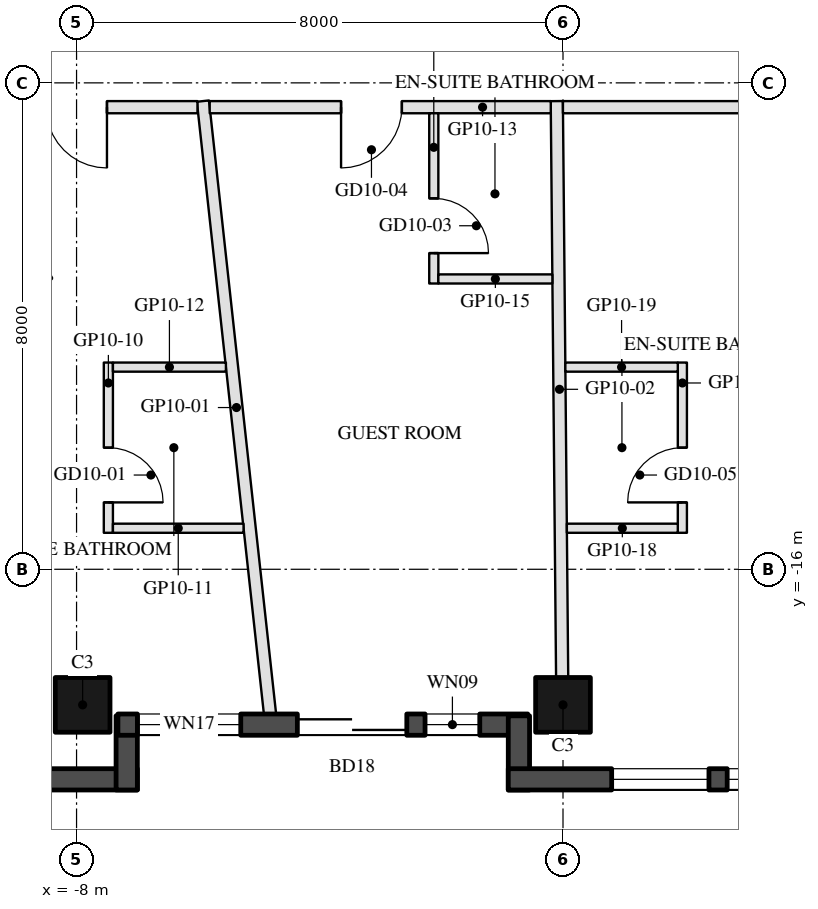
"""IFC4 building model, lengths in metres.
Left out: names, types, materials, properties, quantities, classifications, styles, units other than length and angle.
Written with IfcOpenShell. Run it as: python <this file> out.ifc"""

import sys

from ifc_helpers import new_model, si_unit, direction, frame, frame_2d, origin, origin_2d, place, context, subcontext, project, spatial, rectangle, hollow_rectangle, extrude, element, fill, save


model = new_model("IFC4")
c1 = context("Model", 3, precision=1e-05, world=origin(), true_north=direction((0.0, 1.0)))
c2 = subcontext(c1, "Body", "Model", "MODEL_VIEW")
j1 = project(units=[si_unit("LENGTHUNIT", "METRE"), si_unit("PLANEANGLEUNIT", "RADIAN")], contexts=[c1])
p1 = place(None, origin())
s1 = spatial("IfcSite", under=j1, at=p1, CompositionType="ELEMENT")
p2 = place(p1, origin())
s2 = spatial("IfcBuilding", under=s1, at=p2, CompositionType="ELEMENT")
p3 = place(p2, frame((0.0, 0.0, 120.5)))
s3 = spatial("IfcBuildingStorey", under=s2, at=p3, CompositionType="ELEMENT", Elevation=120.5)
for number, where, z_axis, x_axis in (
    (1, (-7.9, -18.23, 0.0), (0.0, 0.0, 1.0), (-1.0, 0.0, 0.0)),
    (2, (0.0, -18.23, 0.0), (0.0, 0.0, 1.0), (-1.0, 0.0, 0.0)),
):
    element("IfcColumn", number, at=place(p3, frame(where, z_axis=z_axis, x_axis=x_axis)), inside=s3, PredefinedType="COLUMN", context=c2, shape_type="SweptSolid", body=[
        extrude(hollow_rectangle(XDim=0.9, YDim=0.9, WallThickness=0.04, at=origin_2d()), origin(), (0.0, 0.0, 1.0), 3.7),
    ])
p4 = place(p3, frame((-18.816, -19.455, 0.0), z_axis=(0.0, 0.0, 1.0), x_axis=(1.0, 0.0, 0.0)))
e3 = element("IfcWall", 3, at=p4, inside=s3, PredefinedType="SOLIDWALL", context=c2, shape_type="SweptSolid", body=[
    extrude(rectangle(XDim=11.816, YDim=0.35, at=frame_2d((5.908, 0.0))), origin(), (0.0, 0.0, 1.0), 3.55),
])
p5 = place(p4, frame((0.381, 0.0, 0.3)))
e4 = element("IfcOpeningElement", 4, at=p5, cuts=e3, PredefinedType="OPENING", context=c2, shape_type="SweptSolid", body=[
    extrude(rectangle(XDim=1.8, YDim=2.65, at=frame_2d((0.9, 1.325))), frame((0.0, 0.185, 0.0), z_axis=(0.0, -1.0, 0.0), x_axis=(1.0, 0.0, 0.0)), (0.0, 0.0, 1.0), 0.37),
])
p6 = place(p4, frame((7.716, 0.0, 0.0)))
e5 = element("IfcOpeningElement", 5, at=p6, cuts=e3, PredefinedType="OPENING", context=c2, shape_type="SweptSolid", body=[
    extrude(rectangle(XDim=2.4, YDim=2.4, at=frame_2d((1.2, 1.2))), frame((0.0, 0.185, 0.0), z_axis=(0.0, -1.0, 0.0), x_axis=(1.0, 0.0, 0.0)), (0.0, 0.0, 1.0), 0.37),
])
p7 = place(p4, frame((3.816, 0.0, 0.3)))
e6 = element("IfcOpeningElement", 6, at=p7, cuts=e3, PredefinedType="OPENING", context=c2, shape_type="SweptSolid", body=[
    extrude(rectangle(XDim=1.6, YDim=2.65, at=frame_2d((0.8, 1.325))), frame((0.0, 0.185, 0.0), z_axis=(0.0, -1.0, 0.0), x_axis=(1.0, 0.0, 0.0)), (0.0, 0.0, 1.0), 0.37),
])
p8 = place(p4, frame((5.716, 0.0, 0.3)))
e7 = element("IfcOpeningElement", 7, at=p8, cuts=e3, PredefinedType="OPENING", context=c2, shape_type="SweptSolid", body=[
    extrude(rectangle(XDim=1.6, YDim=2.65, at=frame_2d((0.8, 1.325))), frame((0.0, 0.185, 0.0), z_axis=(0.0, -1.0, 0.0), x_axis=(1.0, 0.0, 0.0)), (0.0, 0.0, 1.0), 0.37),
])
p9 = place(p3, frame((-7.175, -19.63, 0.0), z_axis=(0.0, 0.0, 1.0), x_axis=(0.0, 1.0, 0.0)))
e8 = element("IfcWall", 8, at=p9, inside=s3, PredefinedType="SOLIDWALL", context=c2, shape_type="SweptSolid", body=[
    extrude(rectangle(XDim=1.22, YDim=0.35, at=frame_2d((0.61, 0.0))), origin(), (0.0, 0.0, 1.0), 3.55),
])
p10 = place(p3, frame((-7.32, -18.555, 0.0), z_axis=(0.0, 0.0, 1.0), x_axis=(1.0, 0.0, 0.0)))
e9 = element("IfcWall", 9, at=p10, inside=s3, PredefinedType="SOLIDWALL", context=c2, shape_type="SweptSolid", body=[
    extrude(rectangle(XDim=6.74, YDim=0.35, at=frame_2d((3.37, 0.0))), origin(), (0.0, 0.0, 1.0), 3.55),
])
p11 = place(p10, frame((0.32, 0.0, 0.3)))
e10 = element("IfcOpeningElement", 10, at=p11, cuts=e9, PredefinedType="OPENING", context=c2, shape_type="SweptSolid", body=[
    extrude(rectangle(XDim=1.7, YDim=2.65, at=frame_2d((0.85, 1.325))), frame((0.0, 0.185, 0.0), z_axis=(0.0, -1.0, 0.0), x_axis=(1.0, 0.0, 0.0)), (0.0, 0.0, 1.0), 0.37),
])
p12 = place(p10, frame((2.951, 0.0, 0.0)))
e11 = element("IfcOpeningElement", 11, at=p12, cuts=e9, PredefinedType="OPENING", context=c2, shape_type="SweptSolid", body=[
    extrude(rectangle(XDim=1.8, YDim=2.4, at=frame_2d((0.9, 1.2))), frame((0.0, 0.185, 0.0), z_axis=(0.0, -1.0, 0.0), x_axis=(1.0, 0.0, 0.0)), (0.0, 0.0, 1.0), 0.37),
])
p13 = place(p10, frame((5.051, 0.0, 0.3)))
e12 = element("IfcOpeningElement", 12, at=p13, cuts=e9, PredefinedType="OPENING", context=c2, shape_type="SweptSolid", body=[
    extrude(rectangle(XDim=0.9, YDim=2.65, at=frame_2d((0.45, 1.325))), frame((0.0, 0.185, 0.0), z_axis=(0.0, -1.0, 0.0), x_axis=(1.0, 0.0, 0.0)), (0.0, 0.0, 1.0), 0.37),
])
p14 = place(p3, frame((-0.725, -18.41, 0.0), z_axis=(0.0, 0.0, 1.0), x_axis=(0.0, -1.0, 0.0)))
e13 = element("IfcWall", 13, at=p14, inside=s3, PredefinedType="SOLIDWALL", context=c2, shape_type="SweptSolid", body=[
    extrude(rectangle(XDim=1.22, YDim=0.35, at=frame_2d((0.61, 0.0))), origin(), (0.0, 0.0, 1.0), 3.55),
])
p15 = place(p3, frame((-0.9, -19.455, 0.0), z_axis=(0.0, 0.0, 1.0), x_axis=(1.0, 0.0, 0.0)))
e14 = element("IfcWall", 14, at=p15, inside=s3, PredefinedType="SOLIDWALL", context=c2, shape_type="SweptSolid", body=[
    extrude(rectangle(XDim=9.7, YDim=0.35, at=frame_2d((4.85, 0.0))), origin(), (0.0, 0.0, 1.0), 3.55),
])
p16 = place(p15, frame((5.6, 0.0, 0.0)))
e15 = element("IfcOpeningElement", 15, at=p16, cuts=e14, PredefinedType="OPENING", context=c2, shape_type="SweptSolid", body=[
    extrude(rectangle(XDim=2.4, YDim=2.4, at=frame_2d((1.2, 1.2))), frame((0.0, 0.185, 0.0), z_axis=(0.0, -1.0, 0.0), x_axis=(1.0, 0.0, 0.0)), (0.0, 0.0, 1.0), 0.37),
])
p17 = place(p15, frame((1.7, 0.0, 0.3)))
e16 = element("IfcOpeningElement", 16, at=p17, cuts=e14, PredefinedType="OPENING", context=c2, shape_type="SweptSolid", body=[
    extrude(rectangle(XDim=1.6, YDim=2.65, at=frame_2d((0.8, 1.325))), frame((0.0, 0.185, 0.0), z_axis=(0.0, -1.0, 0.0), x_axis=(1.0, 0.0, 0.0)), (0.0, 0.0, 1.0), 0.37),
])
p18 = place(p15, frame((3.6, 0.0, 0.3)))
e17 = element("IfcOpeningElement", 17, at=p18, cuts=e14, PredefinedType="OPENING", context=c2, shape_type="SweptSolid", body=[
    extrude(rectangle(XDim=1.6, YDim=2.65, at=frame_2d((0.8, 1.325))), frame((0.0, 0.185, 0.0), z_axis=(0.0, -1.0, 0.0), x_axis=(1.0, 0.0, 0.0)), (0.0, 0.0, 1.0), 0.37),
])
p19 = place(p3, frame((-4.819, -18.38, 0.0), z_axis=(0.0, 0.0, 1.0), x_axis=(-0.108803544125, 0.994063272023, 0.0)))
e18 = element("IfcWall", 18, at=p19, inside=s3, PredefinedType="PARTITIONING", context=c2, shape_type="SweptSolid", body=[
    extrude(rectangle(XDim=10.14, YDim=0.2, at=frame_2d((5.07, 0.0))), origin(), (0.0, 0.0, 1.0), 2.96),
])
p20 = place(p3, frame((-0.014, -17.78, 0.0), z_axis=(0.0, 0.0, 1.0), x_axis=(-0.00927078365, 0.999957025362, 0.0)))
e19 = element("IfcWall", 19, at=p20, inside=s3, PredefinedType="PARTITIONING", context=c2, shape_type="SweptSolid", body=[
    extrude(rectangle(XDim=9.48, YDim=0.2, at=frame_2d((4.74, 0.0))), origin(), (0.0, 0.0, 1.0), 2.95),
])
p21 = place(p3, frame((-6.011, -8.4, 0.0), z_axis=(0.0, 0.0, 1.0), x_axis=(-1.0, 0.0, 0.0)))
e20 = element("IfcWall", 20, at=p21, inside=s3, PredefinedType="PARTITIONING", context=c2, shape_type="SweptSolid", body=[
    extrude(rectangle(XDim=3.977, YDim=0.2, at=frame_2d((1.988, 0.0))), origin(), (0.0, 0.0, 1.0), 2.95),
])
p22 = place(p21, frame((1.488, 0.0, 0.0)))
e21 = element("IfcOpeningElement", 21, at=p22, cuts=e20, PredefinedType="OPENING", context=c2, shape_type="SweptSolid", body=[
    extrude(rectangle(XDim=1.0, YDim=2.1, at=frame_2d((0.5, 1.05))), frame((0.0, 0.11, 0.0), z_axis=(0.0, -1.0, 0.0), x_axis=(1.0, 0.0, 0.0)), (0.0, 0.0, 1.0), 0.22),
])
p23 = place(p3, frame((-7.477, -12.6, 0.0), z_axis=(0.0, 0.0, 1.0), x_axis=(0.0, -1.0, 0.0)))
e22 = element("IfcWall", 22, at=p23, inside=s3, PredefinedType="PARTITIONING", context=c2, shape_type="SweptSolid", body=[
    extrude(rectangle(XDim=2.8, YDim=0.15, at=frame_2d((1.4, 0.0))), origin(), (0.0, 0.0, 1.0), 3.55),
])
p24 = place(p23, frame((1.4, 0.0, 0.0)))
e23 = element("IfcOpeningElement", 23, at=p24, cuts=e22, PredefinedType="OPENING", context=c2, shape_type="SweptSolid", body=[
    extrude(rectangle(XDim=0.9, YDim=2.1, at=frame_2d((0.45, 1.05))), frame((0.0, 0.085, 0.0), z_axis=(0.0, -1.0, 0.0), x_axis=(1.0, 0.0, 0.0)), (0.0, 0.0, 1.0), 0.17),
])
p25 = place(p3, frame((-7.402, -15.325, 0.0), z_axis=(0.0, 0.0, 1.0), x_axis=(1.0, 0.0, 0.0)))
e24 = element("IfcWall", 24, at=p25, inside=s3, PredefinedType="PARTITIONING", context=c2, shape_type="SweptSolid", body=[
    extrude(rectangle(XDim=2.148, YDim=0.15, at=frame_2d((1.074, 0.0))), origin(), (0.0, 0.0, 1.0), 3.55),
])
p26 = place(p3, frame((-7.402, -12.675, 0.0), z_axis=(0.0, 0.0, 1.0), x_axis=(1.0, 0.0, 0.0)))
e25 = element("IfcWall", 25, at=p26, inside=s3, PredefinedType="PARTITIONING", context=c2, shape_type="SweptSolid", body=[
    extrude(rectangle(XDim=1.858, YDim=0.15, at=frame_2d((0.929, 0.0))), origin(), (0.0, 0.0, 1.0), 3.55),
])
p27 = place(p3, frame((-0.201, -8.4, 0.0), z_axis=(0.0, 0.0, 1.0), x_axis=(-1.0, 0.0, 0.0)))
e26 = element("IfcWall", 26, at=p27, inside=s3, PredefinedType="PARTITIONING", context=c2, shape_type="SweptSolid", body=[
    extrude(rectangle(XDim=5.609, YDim=0.2, at=frame_2d((2.805, 0.0))), origin(), (0.0, 0.0, 1.0), 2.95),
])
p28 = place(p27, frame((2.449, 0.0, 0.0)))
e27 = element("IfcOpeningElement", 27, at=p28, cuts=e26, PredefinedType="OPENING", context=c2, shape_type="SweptSolid", body=[
    extrude(rectangle(XDim=1.0, YDim=2.1, at=frame_2d((0.5, 1.05))), frame((0.0, 0.11, 0.0), z_axis=(0.0, -1.0, 0.0), x_axis=(1.0, 0.0, 0.0)), (0.0, 0.0, 1.0), 0.22),
])
p29 = place(p3, frame((-2.125, -8.5, 0.0), z_axis=(0.0, 0.0, 1.0), x_axis=(0.0, -1.0, 0.0)))
e28 = element("IfcWall", 28, at=p29, inside=s3, PredefinedType="PARTITIONING", context=c2, shape_type="SweptSolid", body=[
    extrude(rectangle(XDim=2.8, YDim=0.15, at=frame_2d((1.4, 0.0))), origin(), (0.0, 0.0, 1.0), 3.55),
])
p30 = place(p29, frame((1.4, 0.0, 0.0)))
e29 = element("IfcOpeningElement", 29, at=p30, cuts=e28, PredefinedType="OPENING", context=c2, shape_type="SweptSolid", body=[
    extrude(rectangle(XDim=0.9, YDim=2.1, at=frame_2d((0.45, 1.05))), frame((0.0, 0.085, 0.0), z_axis=(0.0, -1.0, 0.0), x_axis=(1.0, 0.0, 0.0)), (0.0, 0.0, 1.0), 0.17),
])
p31 = place(p3, frame((-2.05, -11.225, 0.0), z_axis=(0.0, 0.0, 1.0), x_axis=(1.0, 0.0, 0.0)))
e30 = element("IfcWall", 30, at=p31, inside=s3, PredefinedType="PARTITIONING", context=c2, shape_type="SweptSolid", body=[
    extrude(rectangle(XDim=1.875, YDim=0.15, at=frame_2d((0.938, 0.0))), origin(), (0.0, 0.0, 1.0), 3.55),
])
p32 = place(p3, frame((9.988, -8.4, 0.0), z_axis=(0.0, 0.0, 1.0), x_axis=(-1.0, 0.0, 0.0)))
e31 = element("IfcWall", 31, at=p32, inside=s3, PredefinedType="PARTITIONING", context=c2, shape_type="SweptSolid", body=[
    extrude(rectangle(XDim=9.989, YDim=0.2, at=frame_2d((4.995, 0.0))), origin(), (0.0, 0.0, 1.0), 2.95),
])
p33 = place(p32, frame((4.495, 0.0, 0.0)))
e32 = element("IfcOpeningElement", 32, at=p33, cuts=e31, PredefinedType="OPENING", context=c2, shape_type="SweptSolid", body=[
    extrude(rectangle(XDim=1.0, YDim=2.1, at=frame_2d((0.5, 1.05))), frame((0.0, 0.11, 0.0), z_axis=(0.0, -1.0, 0.0), x_axis=(1.0, 0.0, 0.0)), (0.0, 0.0, 1.0), 0.22),
])
p34 = place(p3, frame((1.963, -15.4, 0.0), z_axis=(0.0, 0.0, 1.0), x_axis=(0.0, 1.0, 0.0)))
e33 = element("IfcWall", 33, at=p34, inside=s3, PredefinedType="PARTITIONING", context=c2, shape_type="SweptSolid", body=[
    extrude(rectangle(XDim=2.8, YDim=0.15, at=frame_2d((1.4, 0.0))), origin(), (0.0, 0.0, 1.0), 3.55),
])
p35 = place(p34, frame((0.5, 0.0, 0.0)))
e34 = element("IfcOpeningElement", 34, at=p35, cuts=e33, PredefinedType="OPENING", context=c2, shape_type="SweptSolid", body=[
    extrude(rectangle(XDim=0.9, YDim=2.1, at=frame_2d((0.45, 1.05))), frame((0.0, 0.085, 0.0), z_axis=(0.0, -1.0, 0.0), x_axis=(1.0, 0.0, 0.0)), (0.0, 0.0, 1.0), 0.17),
])
p36 = place(p3, frame((0.063, -15.325, 0.0), z_axis=(0.0, 0.0, 1.0), x_axis=(1.0, 0.0, 0.0)))
e35 = element("IfcWall", 35, at=p36, inside=s3, PredefinedType="PARTITIONING", context=c2, shape_type="SweptSolid", body=[
    extrude(rectangle(XDim=1.825, YDim=0.15, at=frame_2d((0.912, 0.0))), origin(), (0.0, 0.0, 1.0), 2.95),
])
p37 = place(p3, frame((0.039, -12.675, 0.0), z_axis=(0.0, 0.0, 1.0), x_axis=(1.0, 0.0, 0.0)))
e36 = element("IfcWall", 36, at=p37, inside=s3, PredefinedType="PARTITIONING", context=c2, shape_type="SweptSolid", body=[
    extrude(rectangle(XDim=1.849, YDim=0.15, at=frame_2d((0.925, 0.0))), origin(), (0.0, 0.0, 1.0), 2.95),
])
p38 = place(p11, origin())
e37 = element("IfcWindow", 37, at=p38, inside=s3, PartitioningType="SINGLE_PANEL", PredefinedType="WINDOW", context=c2, shape_type="SweptSolid", body=[
    extrude(rectangle(XDim=1.7, YDim=2.65, at=frame_2d((0.85, 1.325))), frame((0.0, 0.03, 0.0), z_axis=(0.0, -1.0, 0.0), x_axis=(1.0, 0.0, 0.0)), (0.0, 0.0, 1.0), 0.06),
])
fill(e10, e37)
p39 = place(p12, frame((1.8, 0.0, 0.0), z_axis=(0.0, 0.0, 1.0), x_axis=(-1.0, 0.0, 0.0)))
e38 = element("IfcDoor", 38, at=p39, inside=s3, OperationType="SLIDING_TO_LEFT", PredefinedType="DOOR", context=c2, shape_type="SweptSolid", body=[
    extrude(rectangle(XDim=1.8, YDim=2.4, at=frame_2d((0.9, 1.2))), frame((0.0, 0.025, 0.0), z_axis=(0.0, -1.0, 0.0), x_axis=(1.0, 0.0, 0.0)), (0.0, 0.0, 1.0), 0.05),
])
fill(e11, e38)
p40 = place(p13, origin())
e39 = element("IfcWindow", 39, at=p40, inside=s3, PartitioningType="SINGLE_PANEL", PredefinedType="WINDOW", context=c2, shape_type="SweptSolid", body=[
    extrude(rectangle(XDim=0.9, YDim=2.65, at=frame_2d((0.45, 1.325))), frame((0.0, 0.03, 0.0), z_axis=(0.0, -1.0, 0.0), x_axis=(1.0, 0.0, 0.0)), (0.0, 0.0, 1.0), 0.06),
])
fill(e12, e39)
p41 = place(p17, origin())
e40 = element("IfcWindow", 40, at=p41, inside=s3, PartitioningType="SINGLE_PANEL", PredefinedType="WINDOW", context=c2, shape_type="SweptSolid", body=[
    extrude(rectangle(XDim=1.6, YDim=2.65, at=frame_2d((0.8, 1.325))), frame((0.0, 0.03, 0.0), z_axis=(0.0, -1.0, 0.0), x_axis=(1.0, 0.0, 0.0)), (0.0, 0.0, 1.0), 0.06),
])
fill(e16, e40)
p42 = place(p18, origin())
e41 = element("IfcWindow", 41, at=p42, inside=s3, PartitioningType="SINGLE_PANEL", PredefinedType="WINDOW", context=c2, shape_type="SweptSolid", body=[
    extrude(rectangle(XDim=1.6, YDim=2.65, at=frame_2d((0.8, 1.325))), frame((0.0, 0.03, 0.0), z_axis=(0.0, -1.0, 0.0), x_axis=(1.0, 0.0, 0.0)), (0.0, 0.0, 1.0), 0.06),
])
fill(e17, e41)
p43 = place(p24, origin())
e42 = element("IfcDoor", 42, at=p43, inside=s3, OperationType="SINGLE_SWING_RIGHT", PredefinedType="DOOR", context=c2, shape_type="SweptSolid", body=[
    extrude(rectangle(XDim=0.9, YDim=2.1, at=frame_2d((0.45, 1.05))), frame((0.0, 0.025, 0.0), z_axis=(0.0, -1.0, 0.0), x_axis=(1.0, 0.0, 0.0)), (0.0, 0.0, 1.0), 0.05),
])
fill(e23, e42)
p44 = place(p22, origin())
e43 = element("IfcDoor", 43, at=p44, inside=s3, OperationType="SINGLE_SWING_LEFT", PredefinedType="DOOR", context=c2, shape_type="SweptSolid", body=[
    extrude(rectangle(XDim=1.0, YDim=2.1, at=frame_2d((0.5, 1.05))), frame((0.0, 0.025, 0.0), z_axis=(0.0, -1.0, 0.0), x_axis=(1.0, 0.0, 0.0)), (0.0, 0.0, 1.0), 0.05),
])
fill(e21, e43)
p45 = place(p30, origin())
e44 = element("IfcDoor", 44, at=p45, inside=s3, OperationType="SINGLE_SWING_RIGHT", PredefinedType="DOOR", context=c2, shape_type="SweptSolid", body=[
    extrude(rectangle(XDim=0.9, YDim=2.1, at=frame_2d((0.45, 1.05))), frame((0.0, 0.025, 0.0), z_axis=(0.0, -1.0, 0.0), x_axis=(1.0, 0.0, 0.0)), (0.0, 0.0, 1.0), 0.05),
])
fill(e29, e44)
p46 = place(p28, origin())
e45 = element("IfcDoor", 45, at=p46, inside=s3, OperationType="SINGLE_SWING_RIGHT", PredefinedType="DOOR", context=c2, shape_type="SweptSolid", body=[
    extrude(rectangle(XDim=1.0, YDim=2.1, at=frame_2d((0.5, 1.05))), frame((0.0, 0.025, 0.0), z_axis=(0.0, -1.0, 0.0), x_axis=(1.0, 0.0, 0.0)), (0.0, 0.0, 1.0), 0.05),
])
fill(e27, e45)
p47 = place(p35, origin())
e46 = element("IfcDoor", 46, at=p47, inside=s3, OperationType="SINGLE_SWING_LEFT", PredefinedType="DOOR", context=c2, shape_type="SweptSolid", body=[
    extrude(rectangle(XDim=0.9, YDim=2.1, at=frame_2d((0.45, 1.05))), frame((0.0, 0.025, 0.0), z_axis=(0.0, -1.0, 0.0), x_axis=(1.0, 0.0, 0.0)), (0.0, 0.0, 1.0), 0.05),
])
fill(e34, e46)
save(model, sys.argv[1])
